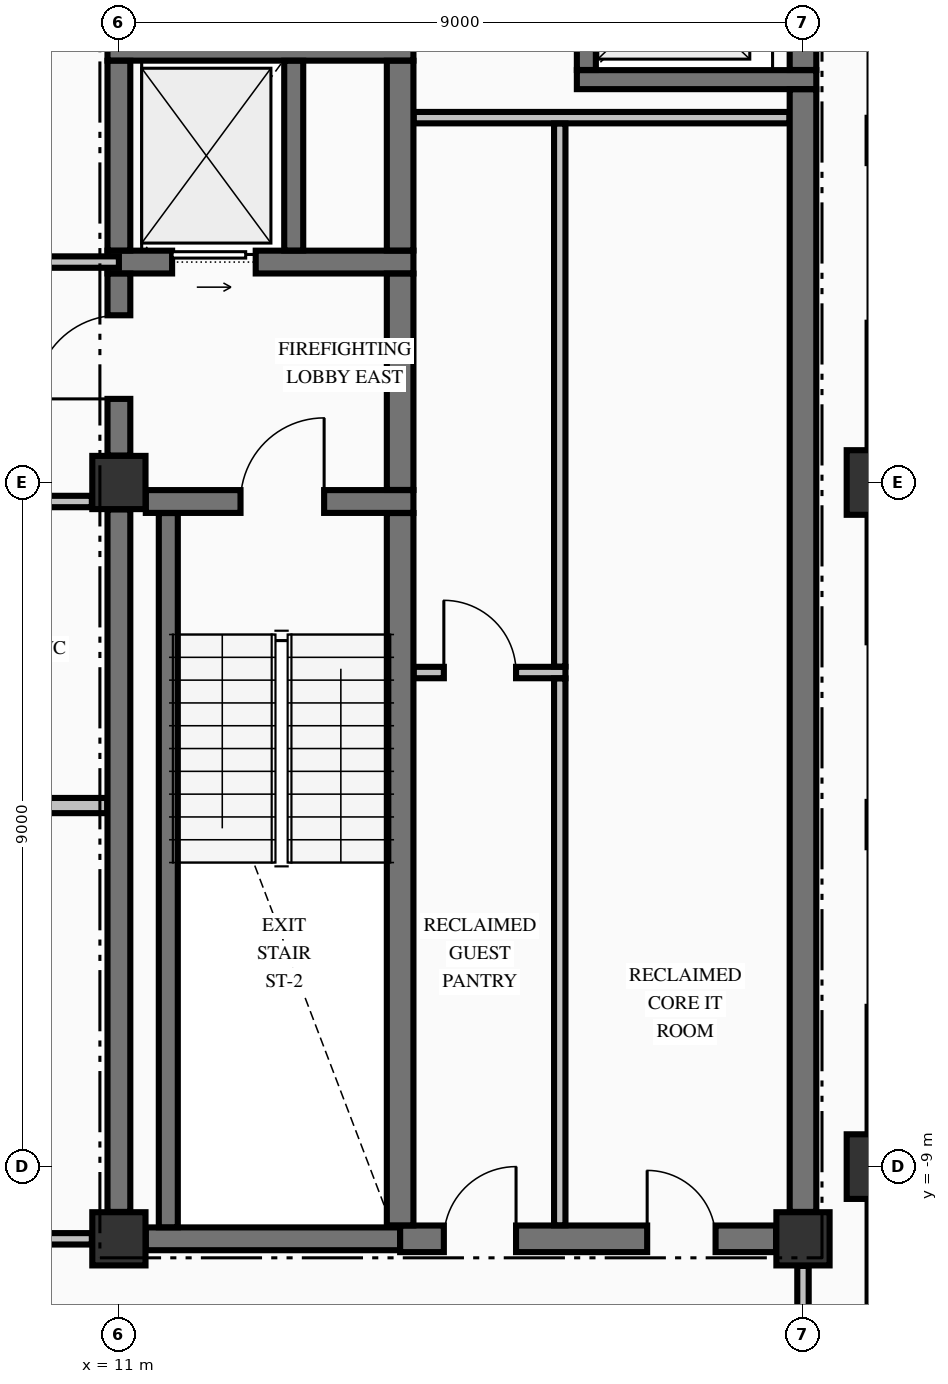
"""IFC4 building model, lengths in metres.
Left out: names, types, materials, properties, quantities, classifications, styles, units other than length and angle.
Written with IfcOpenShell. Run it as: python <this file> out.ifc"""

import sys

from ifc_helpers import new_model, si_unit, direction, frame, frame_2d, origin, origin_2d, place, context, subcontext, project, spatial, rectangle, extrude, element, fill, save


model = new_model("IFC4")
c1 = context("Model", 3, precision=1e-05, world=origin(), true_north=direction((0.0, 1.0)))
c2 = subcontext(c1, "Body", "Model", "MODEL_VIEW")
j1 = project(units=[si_unit("LENGTHUNIT", "METRE"), si_unit("PLANEANGLEUNIT", "RADIAN")], contexts=[c1])
p1 = place(None, origin())
s1 = spatial("IfcSite", under=j1, at=p1, CompositionType="ELEMENT")
p2 = place(p1, origin())
s2 = spatial("IfcBuilding", under=s1, at=p2, CompositionType="ELEMENT")
p3 = place(p2, frame((0.0, 0.0, 274.32)))
s3 = spatial("IfcBuildingStorey", under=s2, at=p3, CompositionType="ELEMENT", Elevation=274.32)
for number, where, z_axis, x_axis in (
    (1, (21.0, -9.0, -0.25), (0.0, 0.0, 1.0), (1.0, 0.0, 0.0)),
    (2, (21.0, 0.0, -0.25), (0.0, 0.0, 1.0), (1.0, 0.0, 0.0)),
):
    element("IfcColumn", number, at=place(p3, frame(where, z_axis=z_axis, x_axis=x_axis)), inside=s3, PredefinedType="COLUMN", context=c2, shape_type="SweptSolid", body=[
        extrude(rectangle(XDim=0.85, YDim=0.85, at=origin_2d()), origin(), (0.0, 0.0, 1.0), 3.565),
    ])
for number, where, z_axis, x_axis in (
    (3, (11.0, -9.95, -0.25), (0.0, 0.0, 1.0), (1.0, 0.0, 0.0)),
    (4, (11.0, 0.0, -0.25), (0.0, 0.0, 1.0), (1.0, 0.0, 0.0)),
    (5, (20.0, -9.95, -0.25), (0.0, 0.0, 1.0), (1.0, 0.0, 0.0)),
):
    element("IfcColumn", number, at=place(p3, frame(where, z_axis=z_axis, x_axis=x_axis)), inside=s3, PredefinedType="COLUMN", context=c2, shape_type="SweptSolid", body=[
        extrude(rectangle(XDim=0.7, YDim=0.7, at=origin_2d()), origin(), (0.0, 0.0, 1.0), 3.565),
    ])
p4 = place(p3, frame((21.0, -17.545, 0.0), z_axis=(0.0, 0.0, 1.0), x_axis=(0.0, 1.0, 0.0)))
e6 = element("IfcWall", 6, at=p4, inside=s3, PredefinedType="STANDARD", context=c2, shape_type="SweptSolid", body=[
    extrude(rectangle(XDim=8.09, YDim=0.3, at=frame_2d((4.045, 0.0))), origin(), (0.0, 0.0, 1.0), 2.707),
])
p5 = place(p3, frame((21.0, -8.545, 0.0), z_axis=(0.0, 0.0, 1.0), x_axis=(0.0, 1.0, 0.0)))
e7 = element("IfcWall", 7, at=p5, inside=s3, PredefinedType="STANDARD", context=c2, shape_type="SweptSolid", body=[
    extrude(rectangle(XDim=8.09, YDim=0.3, at=frame_2d((4.045, 0.0))), origin(), (0.0, 0.0, 1.0), 2.707),
])
p6 = place(p5, frame((1.647, 0.0, 0.7)))
e8 = element("IfcOpeningElement", 8, at=p6, cuts=e7, PredefinedType="OPENING", context=c2, shape_type="SweptSolid", body=[
    extrude(rectangle(XDim=2.1, YDim=1.5, at=frame_2d((1.05, 0.75))), frame((0.0, 0.16, 0.0), z_axis=(0.0, -1.0, 0.0), x_axis=(1.0, 0.0, 0.0)), (0.0, 0.0, 1.0), 0.32),
])
p7 = place(p5, frame((4.343, 0.0, 0.7)))
e9 = element("IfcOpeningElement", 9, at=p7, cuts=e7, PredefinedType="OPENING", context=c2, shape_type="SweptSolid", body=[
    extrude(rectangle(XDim=2.1, YDim=1.5, at=frame_2d((1.05, 0.75))), frame((0.0, 0.16, 0.0), z_axis=(0.0, -1.0, 0.0), x_axis=(1.0, 0.0, 0.0)), (0.0, 0.0, 1.0), 0.32),
])
p8 = place(p3, frame((21.0, 0.455, 0.0), z_axis=(0.0, 0.0, 1.0), x_axis=(0.0, 1.0, 0.0)))
e10 = element("IfcWall", 10, at=p8, inside=s3, PredefinedType="STANDARD", context=c2, shape_type="SweptSolid", body=[
    extrude(rectangle(XDim=8.09, YDim=0.3, at=frame_2d((4.045, 0.0))), origin(), (0.0, 0.0, 1.0), 2.707),
])
p9 = place(p8, frame((1.647, 0.0, 0.7)))
e11 = element("IfcOpeningElement", 11, at=p9, cuts=e10, PredefinedType="OPENING", context=c2, shape_type="SweptSolid", body=[
    extrude(rectangle(XDim=2.1, YDim=1.5, at=frame_2d((1.05, 0.75))), frame((0.0, 0.16, 0.0), z_axis=(0.0, -1.0, 0.0), x_axis=(1.0, 0.0, 0.0)), (0.0, 0.0, 1.0), 0.32),
])
p10 = place(p8, frame((4.343, 0.0, 0.7)))
e12 = element("IfcOpeningElement", 12, at=p10, cuts=e10, PredefinedType="OPENING", context=c2, shape_type="SweptSolid", body=[
    extrude(rectangle(XDim=2.1, YDim=1.5, at=frame_2d((1.05, 0.75))), frame((0.0, 0.16, 0.0), z_axis=(0.0, -1.0, 0.0), x_axis=(1.0, 0.0, 0.0)), (0.0, 0.0, 1.0), 0.32),
])
p11 = place(p3, frame((11.354, -9.95, 0.0), z_axis=(0.0, 0.0, 1.0), x_axis=(1.0, 0.0, 0.0)))
e13 = element("IfcWall", 13, at=p11, inside=s3, PredefinedType="SHEAR", context=c2, shape_type="SweptSolid", body=[
    extrude(rectangle(XDim=3.346, YDim=0.3, at=frame_2d((1.673, 0.0))), origin(), (0.0, 0.0, 1.0), 3.315),
])
p12 = place(p3, frame((14.7, -9.95, 0.0), z_axis=(0.0, 0.0, 1.0), x_axis=(1.0, 0.0, 0.0)))
e14 = element("IfcWall", 14, at=p12, inside=s3, PredefinedType="SHEAR", context=c2, shape_type="SweptSolid", body=[
    extrude(rectangle(XDim=4.946, YDim=0.35, at=frame_2d((2.473, 0.0))), origin(), (0.0, 0.0, 1.0), 3.315),
])
p13 = place(p12, frame((3.25, 0.0, 0.0)))
e15 = element("IfcOpeningElement", 15, at=p13, cuts=e14, PredefinedType="OPENING", context=c2, shape_type="SweptSolid", body=[
    extrude(rectangle(XDim=0.9, YDim=2.15, at=frame_2d((0.45, 1.075))), frame((0.0, 0.185, 0.0), z_axis=(0.0, -1.0, 0.0), x_axis=(1.0, 0.0, 0.0)), (0.0, 0.0, 1.0), 0.37),
])
p14 = place(p12, frame((0.575, 0.0, 0.0)))
e16 = element("IfcOpeningElement", 16, at=p14, cuts=e14, PredefinedType="OPENING", context=c2, shape_type="SweptSolid", body=[
    extrude(rectangle(XDim=0.95, YDim=2.15, at=frame_2d((0.475, 1.075))), frame((0.0, 0.185, 0.0), z_axis=(0.0, -1.0, 0.0), x_axis=(1.0, 0.0, 0.0)), (0.0, 0.0, 1.0), 0.37),
])
p15 = place(p3, frame((11.354, -0.25, 0.0), z_axis=(0.0, 0.0, 1.0), x_axis=(1.0, 0.0, 0.0)))
e17 = element("IfcWall", 17, at=p15, inside=s3, PredefinedType="SHEAR", context=c2, shape_type="SweptSolid", body=[
    extrude(rectangle(XDim=3.521, YDim=0.3, at=frame_2d((1.76, 0.0))), origin(), (0.0, 0.0, 1.0), 3.315),
])
p16 = place(p15, frame((1.246, 0.0, 0.0)))
e18 = element("IfcOpeningElement", 18, at=p16, cuts=e17, PredefinedType="OPENING", context=c2, shape_type="SweptSolid", body=[
    extrude(rectangle(XDim=1.1, YDim=2.15, at=frame_2d((0.55, 1.075))), frame((0.0, 0.16, 0.0), z_axis=(0.0, -1.0, 0.0), x_axis=(1.0, 0.0, 0.0)), (0.0, 0.0, 1.0), 0.32),
])
p17 = place(p3, frame((10.85, 2.9, 0.0), z_axis=(0.0, 0.0, 1.0), x_axis=(1.0, 0.0, 0.0)))
e19 = element("IfcWall", 19, at=p17, inside=s3, PredefinedType="SHEAR", context=c2, shape_type="SweptSolid", body=[
    extrude(rectangle(XDim=4.025, YDim=0.3, at=frame_2d((2.012, 0.0))), origin(), (0.0, 0.0, 1.0), 3.315),
])
p18 = place(p17, frame((0.85, 0.0, 0.0)))
e20 = element("IfcOpeningElement", 20, at=p18, cuts=e19, PredefinedType="OPENING", context=c2, shape_type="SweptSolid", body=[
    extrude(rectangle(XDim=1.1, YDim=2.2, at=frame_2d((0.55, 1.1))), frame((0.0, 0.16, 0.0), z_axis=(0.0, -1.0, 0.0), x_axis=(1.0, 0.0, 0.0)), (0.0, 0.0, 1.0), 0.32),
])
p19 = place(p3, frame((17.025, 5.3, 0.0), z_axis=(0.0, 0.0, 1.0), x_axis=(1.0, 0.0, 0.0)))
e21 = element("IfcWall", 21, at=p19, inside=s3, PredefinedType="SOLIDWALL", context=c2, shape_type="SweptSolid", body=[
    extrude(rectangle(XDim=3.15, YDim=0.25, at=frame_2d((1.575, 0.0))), origin(), (0.0, 0.0, 1.0), 3.315),
])
p20 = place(p3, frame((10.85, 5.7, 0.0), z_axis=(0.0, 0.0, 1.0), x_axis=(1.0, 0.0, 0.0)))
e22 = element("IfcWall", 22, at=p20, inside=s3, PredefinedType="SHEAR", context=c2, shape_type="SweptSolid", body=[
    extrude(rectangle(XDim=4.025, YDim=0.3, at=frame_2d((2.012, 0.0))), origin(), (0.0, 0.0, 1.0), 3.315),
])
p21 = place(p3, frame((-10.644, -9.95, 0.0), z_axis=(0.0, 0.0, 1.0), x_axis=(1.0, 0.0, 0.0)))
e23 = element("IfcWall", 23, at=p21, inside=s3, PredefinedType="PARTITIONING", context=c2, shape_type="SweptSolid", body=[
    extrude(rectangle(XDim=21.288, YDim=0.15, at=frame_2d((10.644, 0.0))), origin(), (0.0, 0.0, 1.0), 3.315),
])
p22 = place(p21, frame((8.294, 0.0, 0.0)))
e24 = element("IfcOpeningElement", 24, at=p22, cuts=e23, PredefinedType="OPENING", context=c2, shape_type="SweptSolid", body=[
    extrude(rectangle(XDim=1.1, YDim=2.15, at=frame_2d((0.55, 1.075))), frame((0.0, 0.085, 0.0), z_axis=(0.0, -1.0, 0.0), x_axis=(1.0, 0.0, 0.0)), (0.0, 0.0, 1.0), 0.17),
])
p23 = place(p21, frame((13.769, 0.0, 0.0)))
e25 = element("IfcOpeningElement", 25, at=p23, cuts=e23, PredefinedType="OPENING", context=c2, shape_type="SweptSolid", body=[
    extrude(rectangle(XDim=0.95, YDim=2.15, at=frame_2d((0.475, 1.075))), frame((0.0, 0.085, 0.0), z_axis=(0.0, -1.0, 0.0), x_axis=(1.0, 0.0, 0.0)), (0.0, 0.0, 1.0), 0.17),
])
p24 = place(p21, frame((17.994, 0.0, 0.0)))
e26 = element("IfcOpeningElement", 26, at=p24, cuts=e23, PredefinedType="OPENING", context=c2, shape_type="SweptSolid", body=[
    extrude(rectangle(XDim=0.9, YDim=2.15, at=frame_2d((0.45, 1.075))), frame((0.0, 0.085, 0.0), z_axis=(0.0, -1.0, 0.0), x_axis=(1.0, 0.0, 0.0)), (0.0, 0.0, 1.0), 0.17),
])
p25 = place(p3, frame((-0.775, -4.25, 0.0), z_axis=(0.0, 0.0, 1.0), x_axis=(1.0, 0.0, 0.0)))
e27 = element("IfcWall", 27, at=p25, inside=s3, PredefinedType="PARTITIONING", context=c2, shape_type="SweptSolid", body=[
    extrude(rectangle(XDim=11.622, YDim=0.2, at=frame_2d((5.811, 0.0))), origin(), (0.0, 0.0, 1.0), 3.315),
])
p26 = place(p3, frame((14.878, -2.5, 0.0), z_axis=(0.0, 0.0, 1.0), x_axis=(1.0, 0.0, 0.0)))
e28 = element("IfcWall", 28, at=p26, inside=s3, PredefinedType="PARTITIONING", context=c2, shape_type="SweptSolid", body=[
    extrude(rectangle(XDim=1.997, YDim=0.15, at=frame_2d((0.999, 0.0))), origin(), (0.0, 0.0, 1.0), 3.315),
])
p27 = place(p26, frame((0.397, 0.0, 0.0)))
e29 = element("IfcOpeningElement", 29, at=p27, cuts=e28, PredefinedType="OPENING", context=c2, shape_type="SweptSolid", body=[
    extrude(rectangle(XDim=0.95, YDim=2.15, at=frame_2d((0.475, 1.075))), frame((0.0, 0.085, 0.0), z_axis=(0.0, -1.0, 0.0), x_axis=(1.0, 0.0, 0.0)), (0.0, 0.0, 1.0), 0.17),
])
p28 = place(p3, frame((-10.644, -0.25, 0.0), z_axis=(0.0, 0.0, 1.0), x_axis=(1.0, 0.0, 0.0)))
e30 = element("IfcWall", 30, at=p28, inside=s3, PredefinedType="PARTITIONING", context=c2, shape_type="SweptSolid", body=[
    extrude(rectangle(XDim=21.288, YDim=0.15, at=frame_2d((10.644, 0.0))), origin(), (0.0, 0.0, 1.0), 3.315),
])
p29 = place(p28, frame((8.294, 0.0, 0.0)))
e31 = element("IfcOpeningElement", 31, at=p29, cuts=e30, PredefinedType="OPENING", context=c2, shape_type="SweptSolid", body=[
    extrude(rectangle(XDim=1.1, YDim=2.15, at=frame_2d((0.55, 1.075))), frame((0.0, 0.085, 0.0), z_axis=(0.0, -1.0, 0.0), x_axis=(1.0, 0.0, 0.0)), (0.0, 0.0, 1.0), 0.17),
])
p30 = place(p28, frame((3.169, 0.0, 0.0)))
e32 = element("IfcOpeningElement", 32, at=p30, cuts=e30, PredefinedType="OPENING", context=c2, shape_type="SweptSolid", body=[
    extrude(rectangle(XDim=1.05, YDim=2.15, at=frame_2d((0.525, 1.075))), frame((0.0, 0.085, 0.0), z_axis=(0.0, -1.0, 0.0), x_axis=(1.0, 0.0, 0.0)), (0.0, 0.0, 1.0), 0.17),
])
p31 = place(p28, frame((15.319, 0.0, 0.0)))
e33 = element("IfcOpeningElement", 33, at=p31, cuts=e30, PredefinedType="OPENING", context=c2, shape_type="SweptSolid", body=[
    extrude(rectangle(XDim=0.95, YDim=2.15, at=frame_2d((0.475, 1.075))), frame((0.0, 0.085, 0.0), z_axis=(0.0, -1.0, 0.0), x_axis=(1.0, 0.0, 0.0)), (0.0, 0.0, 1.0), 0.17),
])
p32 = place(p3, frame((-11.0, 2.9, 0.0), z_axis=(0.0, 0.0, 1.0), x_axis=(1.0, 0.0, 0.0)))
e34 = element("IfcWall", 34, at=p32, inside=s3, PredefinedType="PARTITIONING", context=c2, shape_type="SweptSolid", body=[
    extrude(rectangle(XDim=22.0, YDim=0.15, at=frame_2d((11.0, 0.0))), origin(), (0.0, 0.0, 1.0), 3.315),
])
p33 = place(p32, frame((8.65, 0.0, 0.0)))
e35 = element("IfcOpeningElement", 35, at=p33, cuts=e34, PredefinedType="OPENING", context=c2, shape_type="SweptSolid", body=[
    extrude(rectangle(XDim=1.1, YDim=2.15, at=frame_2d((0.55, 1.075))), frame((0.0, 0.085, 0.0), z_axis=(0.0, -1.0, 0.0), x_axis=(1.0, 0.0, 0.0)), (0.0, 0.0, 1.0), 0.17),
])
p34 = place(p32, frame((3.525, 0.0, 0.0)))
e36 = element("IfcOpeningElement", 36, at=p34, cuts=e34, PredefinedType="OPENING", context=c2, shape_type="SweptSolid", body=[
    extrude(rectangle(XDim=1.05, YDim=2.15, at=frame_2d((0.525, 1.075))), frame((0.0, 0.085, 0.0), z_axis=(0.0, -1.0, 0.0), x_axis=(1.0, 0.0, 0.0)), (0.0, 0.0, 1.0), 0.17),
])
p35 = place(p32, frame((12.225, 0.0, 0.0)))
e37 = element("IfcOpeningElement", 37, at=p35, cuts=e34, PredefinedType="OPENING", context=c2, shape_type="SweptSolid", body=[
    extrude(rectangle(XDim=0.95, YDim=2.15, at=frame_2d((0.475, 1.075))), frame((0.0, 0.085, 0.0), z_axis=(0.0, -1.0, 0.0), x_axis=(1.0, 0.0, 0.0)), (0.0, 0.0, 1.0), 0.17),
])
p36 = place(p32, frame((18.075, 0.0, 0.0)))
e38 = element("IfcOpeningElement", 38, at=p36, cuts=e34, PredefinedType="OPENING", context=c2, shape_type="SweptSolid", body=[
    extrude(rectangle(XDim=0.95, YDim=2.15, at=frame_2d((0.475, 1.075))), frame((0.0, 0.085, 0.0), z_axis=(0.0, -1.0, 0.0), x_axis=(1.0, 0.0, 0.0)), (0.0, 0.0, 1.0), 0.17),
])
p37 = place(p3, frame((14.878, 4.8, 0.0), z_axis=(0.0, 0.0, 1.0), x_axis=(1.0, 0.0, 0.0)))
e39 = element("IfcWall", 39, at=p37, inside=s3, PredefinedType="PARTITIONING", context=c2, shape_type="SweptSolid", body=[
    extrude(rectangle(XDim=4.944, YDim=0.15, at=frame_2d((2.472, 0.0))), origin(), (0.0, 0.0, 1.0), 3.315),
])
p38 = place(p3, frame((11.0, -9.596, 0.0), z_axis=(0.0, 0.0, 1.0), x_axis=(0.0, 1.0, 0.0)))
e40 = element("IfcWall", 40, at=p38, inside=s3, PredefinedType="SHEAR", context=c2, shape_type="SweptSolid", body=[
    extrude(rectangle(XDim=9.242, YDim=0.3, at=frame_2d((4.621, 0.0))), origin(), (0.0, 0.0, 1.0), 3.315),
])
p39 = place(p3, frame((11.0, 0.354, 0.0), z_axis=(0.0, 0.0, 1.0), x_axis=(0.0, 1.0, 0.0)))
e41 = element("IfcWall", 41, at=p39, inside=s3, PredefinedType="SHEAR", context=c2, shape_type="SweptSolid", body=[
    extrude(rectangle(XDim=2.394, YDim=0.3, at=frame_2d((1.197, 0.0))), origin(), (0.0, 0.0, 1.0), 3.315),
])
p40 = place(p39, frame((0.746, 0.0, 0.0)))
e42 = element("IfcOpeningElement", 42, at=p40, cuts=e41, PredefinedType="OPENING", context=c2, shape_type="SweptSolid", body=[
    extrude(rectangle(XDim=1.1, YDim=2.15, at=frame_2d((0.55, 1.075))), frame((0.0, 0.16, 0.0), z_axis=(0.0, -1.0, 0.0), x_axis=(1.0, 0.0, 0.0)), (0.0, 0.0, 1.0), 0.32),
])
p41 = place(p3, frame((11.0, 3.052, 0.0), z_axis=(0.0, 0.0, 1.0), x_axis=(0.0, 1.0, 0.0)))
e43 = element("IfcWall", 43, at=p41, inside=s3, PredefinedType="SHEAR", context=c2, shape_type="SweptSolid", body=[
    extrude(rectangle(XDim=2.496, YDim=0.3, at=frame_2d((1.248, 0.0))), origin(), (0.0, 0.0, 1.0), 3.315),
])
p42 = place(p3, frame((11.65, -9.798, 0.0), z_axis=(0.0, 0.0, 1.0), x_axis=(0.0, 1.0, 0.0)))
e44 = element("IfcWall", 44, at=p42, inside=s3, PredefinedType="SOLIDWALL", context=c2, shape_type="SweptSolid", body=[
    extrude(rectangle(XDim=9.396, YDim=0.25, at=frame_2d((4.698, 0.0))), origin(), (0.0, 0.0, 1.0), 3.315),
])
p43 = place(p3, frame((13.3, 3.052, 0.0), z_axis=(0.0, 0.0, 1.0), x_axis=(0.0, 1.0, 0.0)))
e45 = element("IfcWall", 45, at=p43, inside=s3, PredefinedType="SOLIDWALL", context=c2, shape_type="SweptSolid", body=[
    extrude(rectangle(XDim=2.496, YDim=0.25, at=frame_2d((1.248, 0.0))), origin(), (0.0, 0.0, 1.0), 3.315),
])
p44 = place(p3, frame((14.7, -9.773, 0.0), z_axis=(0.0, 0.0, 1.0), x_axis=(0.0, 1.0, 0.0)))
e46 = element("IfcWall", 46, at=p44, inside=s3, PredefinedType="SHEAR", context=c2, shape_type="SweptSolid", body=[
    extrude(rectangle(XDim=9.371, YDim=0.35, at=frame_2d((4.686, 0.0))), origin(), (0.0, 0.0, 1.0), 3.315),
])
p45 = place(p3, frame((14.7, -0.098, 0.0), z_axis=(0.0, 0.0, 1.0), x_axis=(0.0, 1.0, 0.0)))
e47 = element("IfcWall", 47, at=p45, inside=s3, PredefinedType="SHEAR", context=c2, shape_type="SweptSolid", body=[
    extrude(rectangle(XDim=2.846, YDim=0.35, at=frame_2d((1.423, 0.0))), origin(), (0.0, 0.0, 1.0), 3.315),
])
p46 = place(p3, frame((14.7, 3.052, 0.0), z_axis=(0.0, 0.0, 1.0), x_axis=(0.0, 1.0, 0.0)))
e48 = element("IfcWall", 48, at=p46, inside=s3, PredefinedType="SHEAR", context=c2, shape_type="SweptSolid", body=[
    extrude(rectangle(XDim=2.496, YDim=0.35, at=frame_2d((1.248, 0.0))), origin(), (0.0, 0.0, 1.0), 3.315),
])
p47 = place(p3, frame((17.15, 5.427, 0.0), z_axis=(0.0, 0.0, 1.0), x_axis=(0.0, 1.0, 0.0)))
e49 = element("IfcWall", 49, at=p47, inside=s3, PredefinedType="SOLIDWALL", context=c2, shape_type="SweptSolid", body=[
    extrude(rectangle(XDim=2.196, YDim=0.25, at=frame_2d((1.098, 0.0))), origin(), (0.0, 0.0, 1.0), 3.315),
])
p48 = place(p47, frame((0.548, 0.0, 0.0)))
e50 = element("IfcOpeningElement", 50, at=p48, cuts=e49, PredefinedType="OPENING", context=c2, shape_type="SweptSolid", body=[
    extrude(rectangle(XDim=1.1, YDim=2.2, at=frame_2d((0.55, 1.1))), frame((0.0, 0.135, 0.0), z_axis=(0.0, -1.0, 0.0), x_axis=(1.0, 0.0, 0.0)), (0.0, 0.0, 1.0), 0.27),
])
p49 = place(p3, frame((20.0, -9.596, 0.0), z_axis=(0.0, 0.0, 1.0), x_axis=(0.0, 1.0, 0.0)))
e51 = element("IfcWall", 51, at=p49, inside=s3, PredefinedType="SHEAR", context=c2, shape_type="SweptSolid", body=[
    extrude(rectangle(XDim=14.769, YDim=0.35, at=frame_2d((7.385, 0.0))), origin(), (0.0, 0.0, 1.0), 3.315),
])
p50 = place(p3, frame((20.0, 5.427, 0.0), z_axis=(0.0, 0.0, 1.0), x_axis=(0.0, 1.0, 0.0)))
e52 = element("IfcWall", 52, at=p50, inside=s3, PredefinedType="SHEAR", context=c2, shape_type="SweptSolid", body=[
    extrude(rectangle(XDim=2.196, YDim=0.35, at=frame_2d((1.098, 0.0))), origin(), (0.0, 0.0, 1.0), 3.315),
])
p51 = place(p3, frame((16.8, -9.772, 0.0), z_axis=(0.0, 0.0, 1.0), x_axis=(0.0, 1.0, 0.0)))
e53 = element("IfcWall", 53, at=p51, inside=s3, PredefinedType="PARTITIONING", context=c2, shape_type="SweptSolid", body=[
    extrude(rectangle(XDim=7.194, YDim=0.15, at=frame_2d((3.597, 0.0))), origin(), (0.0, 0.0, 1.0), 3.315),
])
p52 = place(p3, frame((16.8, -2.422, 0.0), z_axis=(0.0, 0.0, 1.0), x_axis=(0.0, 1.0, 0.0)))
e54 = element("IfcWall", 54, at=p52, inside=s3, PredefinedType="PARTITIONING", context=c2, shape_type="SweptSolid", body=[
    extrude(rectangle(XDim=7.144, YDim=0.15, at=frame_2d((3.572, 0.0))), origin(), (0.0, 0.0, 1.0), 3.315),
])
p53 = place(p3, frame((20.0, -12.972, 0.0), z_axis=(0.0, 0.0, 1.0), x_axis=(0.0, 1.0, 0.0)))
e55 = element("IfcWall", 55, at=p53, inside=s3, PredefinedType="PARTITIONING", context=c2, shape_type="SweptSolid", body=[
    extrude(rectangle(XDim=2.666, YDim=0.15, at=frame_2d((1.333, 0.0))), origin(), (0.0, 0.0, 1.0), 2.905),
])
p54 = place(p16, origin())
e56 = element("IfcDoor", 56, at=p54, inside=s3, OperationType="SINGLE_SWING_RIGHT", PredefinedType="DOOR", context=c2, shape_type="SweptSolid", body=[
    extrude(rectangle(XDim=1.1, YDim=2.15, at=frame_2d((0.55, 1.075))), frame((0.0, 0.025, 0.0), z_axis=(0.0, -1.0, 0.0), x_axis=(1.0, 0.0, 0.0)), (0.0, 0.0, 1.0), 0.05),
])
fill(e18, e56)
p55 = place(p40, origin())
e57 = element("IfcDoor", 57, at=p55, inside=s3, OperationType="SINGLE_SWING_LEFT", PredefinedType="DOOR", context=c2, shape_type="SweptSolid", body=[
    extrude(rectangle(XDim=1.1, YDim=2.15, at=frame_2d((0.55, 1.075))), frame((0.0, 0.025, 0.0), z_axis=(0.0, -1.0, 0.0), x_axis=(1.0, 0.0, 0.0)), (0.0, 0.0, 1.0), 0.05),
])
fill(e42, e57)
p56 = place(p18, origin())
e58 = element("IfcDoor", 58, at=p56, inside=s3, OperationType="SLIDING_TO_RIGHT", PredefinedType="DOOR", context=c2, shape_type="SweptSolid", body=[
    extrude(rectangle(XDim=1.1, YDim=2.2, at=frame_2d((0.55, 1.1))), frame((0.0, 0.025, 0.0), z_axis=(0.0, -1.0, 0.0), x_axis=(1.0, 0.0, 0.0)), (0.0, 0.0, 1.0), 0.05),
])
fill(e20, e58)
p57 = place(p13, origin())
e59 = element("IfcDoor", 59, at=p57, inside=s3, OperationType="SINGLE_SWING_LEFT", PredefinedType="DOOR", context=c2, shape_type="SweptSolid", body=[
    extrude(rectangle(XDim=0.9, YDim=2.15, at=frame_2d((0.45, 1.075))), frame((0.0, 0.025, 0.0), z_axis=(0.0, -1.0, 0.0), x_axis=(1.0, 0.0, 0.0)), (0.0, 0.0, 1.0), 0.05),
])
fill(e15, e59)
p58 = place(p14, origin())
e60 = element("IfcDoor", 60, at=p58, inside=s3, OperationType="SINGLE_SWING_RIGHT", PredefinedType="DOOR", context=c2, shape_type="SweptSolid", body=[
    extrude(rectangle(XDim=0.95, YDim=2.15, at=frame_2d((0.475, 1.075))), frame((0.0, 0.025, 0.0), z_axis=(0.0, -1.0, 0.0), x_axis=(1.0, 0.0, 0.0)), (0.0, 0.0, 1.0), 0.05),
])
fill(e16, e60)
p59 = place(p27, origin())
e61 = element("IfcDoor", 61, at=p59, inside=s3, OperationType="SINGLE_SWING_LEFT", PredefinedType="DOOR", context=c2, shape_type="SweptSolid", body=[
    extrude(rectangle(XDim=0.95, YDim=2.15, at=frame_2d((0.475, 1.075))), frame((0.0, 0.025, 0.0), z_axis=(0.0, -1.0, 0.0), x_axis=(1.0, 0.0, 0.0)), (0.0, 0.0, 1.0), 0.05),
])
fill(e29, e61)
save(model, sys.argv[1])
